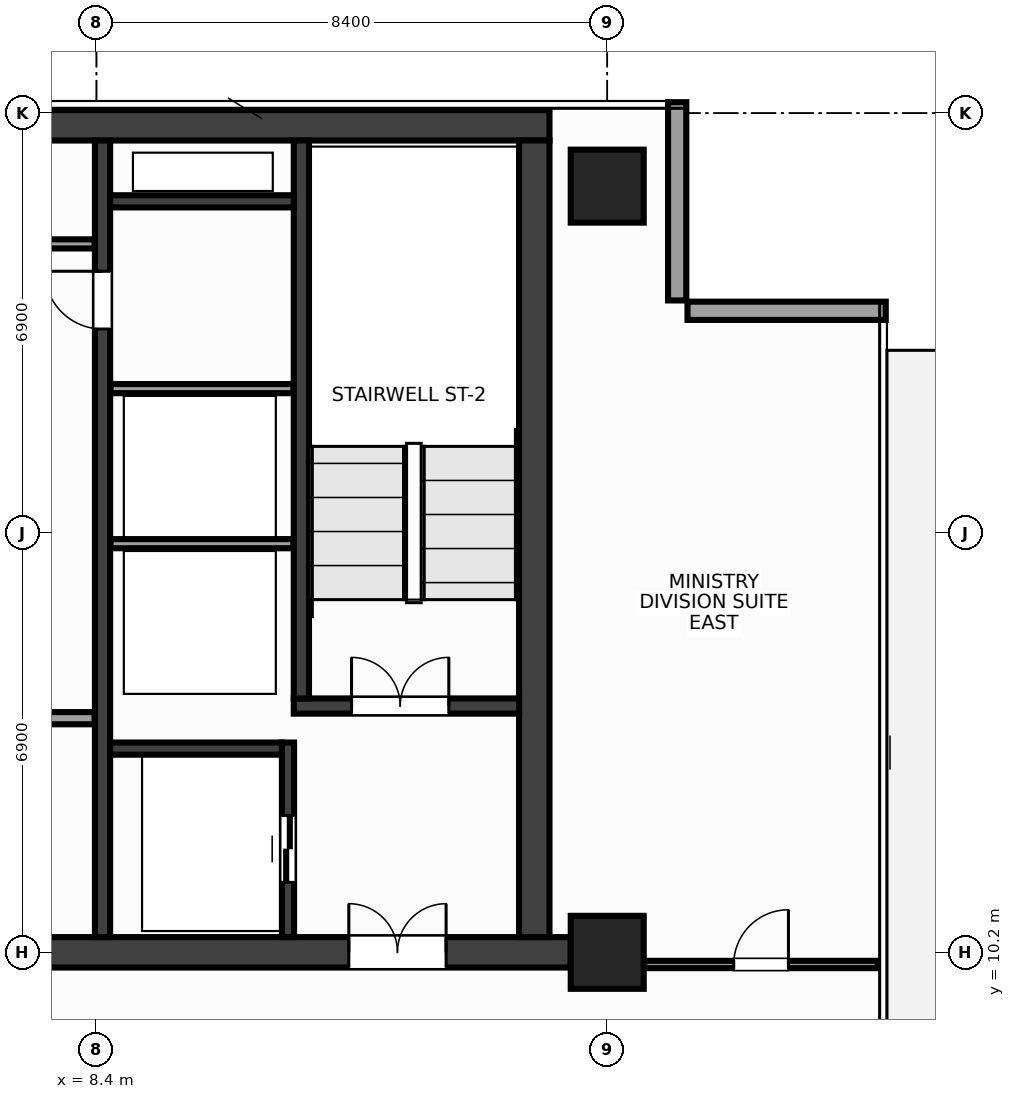
"""IFC4 building model, lengths in metres.
Left out: names, types, materials, properties, quantities, classifications, styles, units other than length and angle.
Written with IfcOpenShell. Run it as: python <this file> out.ifc"""

import sys

from ifc_helpers import new_model, si_unit, direction, frame, frame_2d, origin, origin_2d, place, context, subcontext, project, spatial, rectangle, extrude, source, transform, mapped, element, fill, save


model = new_model("IFC4")
c1 = context("Model", 3, precision=1e-05, world=origin(), true_north=direction((0.0, 1.0)))
c2 = subcontext(c1, "Body", "Model", "MODEL_VIEW")
j1 = project(units=[si_unit("LENGTHUNIT", "METRE"), si_unit("PLANEANGLEUNIT", "RADIAN")], contexts=[c1])
p1 = place(None, origin())
s1 = spatial("IfcSite", under=j1, at=p1, CompositionType="ELEMENT")
p2 = place(p1, origin())
s2 = spatial("IfcBuilding", under=s1, at=p2, CompositionType="ELEMENT")
p3 = place(p2, frame((0.0, 0.0, 272.0)))
s3 = spatial("IfcBuildingStorey", under=s2, at=p3, CompositionType="ELEMENT", Elevation=272.0)
m1 = source(origin(), c2, "Body", "SweptSolid", [
    extrude(rectangle(XDim=31.7, YDim=0.5, at=frame_2d((15.85, 0.0))), origin(), (0.0, 0.0, 1.0), 3.6),
])
p4 = place(p3, frame((-15.85, 23.8, 0.0), z_axis=(0.0, 0.0, 1.0), x_axis=(1.0, 0.0, 0.0)))
e1 = element("IfcWall", 1, at=p4, inside=s3, PredefinedType="SHEAR", context=c2, shape_type="MappedRepresentation", body=[
    mapped(m1, transform((0.0, 0.0, 0.0), x_axis=(1.0, 0.0, 0.0), y_axis=(0.0, 1.0, 0.0), z_axis=(0.0, 0.0, 1.0), scale=1.0)),
])
m2 = source(origin(), c2, "Body", "SweptSolid", [
    extrude(rectangle(XDim=32.4, YDim=0.5, at=frame_2d((16.2, 0.0))), origin(), (0.0, 0.0, 1.0), 3.6),
])
p5 = place(p3, frame((-16.2, 10.2, 0.0), z_axis=(0.0, 0.0, 1.0), x_axis=(1.0, 0.0, 0.0)))
e2 = element("IfcWall", 2, at=p5, inside=s3, PredefinedType="SHEAR", context=c2, shape_type="MappedRepresentation", body=[
    mapped(m2, transform((0.0, 0.0, 0.0), x_axis=(1.0, 0.0, 0.0), y_axis=(0.0, 1.0, 0.0), z_axis=(0.0, 0.0, 1.0), scale=1.0)),
])
p6 = place(p5, frame((2.05, 0.0, 0.0)))
e3 = element("IfcOpeningElement", 3, at=p6, cuts=e2, PredefinedType="OPENING", context=c2, shape_type="SweptSolid", body=[
    extrude(rectangle(XDim=1.6, YDim=2.15, at=frame_2d((0.8, 1.075))), frame((0.0, 0.262, 0.0), z_axis=(0.0, -1.0, 0.0), x_axis=(1.0, 0.0, 0.0)), (0.0, 0.0, 1.0), 0.524),
])
p7 = place(p5, frame((28.75, 0.0, 0.0)))
e4 = element("IfcOpeningElement", 4, at=p7, cuts=e2, PredefinedType="OPENING", context=c2, shape_type="SweptSolid", body=[
    extrude(rectangle(XDim=1.6, YDim=2.15, at=frame_2d((0.8, 1.075))), frame((0.0, 0.262, 0.0), z_axis=(0.0, -1.0, 0.0), x_axis=(1.0, 0.0, 0.0)), (0.0, 0.0, 1.0), 0.524),
])
p8 = place(p5, frame((15.45, 0.0, 0.0)))
e5 = element("IfcOpeningElement", 5, at=p8, cuts=e2, PredefinedType="OPENING", context=c2, shape_type="SweptSolid", body=[
    extrude(rectangle(XDim=1.5, YDim=2.2, at=frame_2d((0.75, 1.1))), frame((0.0, 0.262, 0.0), z_axis=(0.0, -1.0, 0.0), x_axis=(1.0, 0.0, 0.0)), (0.0, 0.0, 1.0), 0.524),
])
m3 = source(origin(), c2, "Body", "SweptSolid", [
    extrude(rectangle(XDim=13.1, YDim=0.5, at=frame_2d((6.55, 0.0))), origin(), (0.0, 0.0, 1.0), 3.6),
])
p9 = place(p3, frame((15.6, 10.45, 0.0), z_axis=(0.0, 0.0, 1.0), x_axis=(0.0, 1.0, 0.0)))
e6 = element("IfcWall", 6, at=p9, inside=s3, PredefinedType="SHEAR", context=c2, shape_type="MappedRepresentation", body=[
    mapped(m3, transform((0.0, 0.0, 0.0), x_axis=(1.0, 0.0, 0.0), y_axis=(0.0, 1.0, 0.0), z_axis=(0.0, 0.0, 1.0), scale=1.0)),
])
m4 = source(origin(), c2, "Body", "SweptSolid", [
    extrude(rectangle(XDim=13.1, YDim=0.25, at=frame_2d((6.55, 0.0))), origin(), (0.0, 0.0, 1.0), 3.6),
])
p10 = place(p3, frame((8.5, 10.45, 0.0), z_axis=(0.0, 0.0, 1.0), x_axis=(0.0, 1.0, 0.0)))
e7 = element("IfcWall", 7, at=p10, inside=s3, PredefinedType="SHEAR", context=c2, shape_type="MappedRepresentation", body=[
    mapped(m4, transform((0.0, 0.0, 0.0), x_axis=(1.0, 0.0, 0.0), y_axis=(0.0, 1.0, 0.0), z_axis=(0.0, 0.0, 1.0), scale=1.0)),
])
p11 = place(p10, frame((10.0, 0.0, 0.0)))
e8 = element("IfcOpeningElement", 8, at=p11, cuts=e7, PredefinedType="OPENING", context=c2, shape_type="SweptSolid", body=[
    extrude(rectangle(XDim=0.95, YDim=2.15, at=frame_2d((0.475, 1.075))), frame((0.0, 0.137, 0.0), z_axis=(0.0, -1.0, 0.0), x_axis=(1.0, 0.0, 0.0)), (0.0, 0.0, 1.0), 0.274),
])
m5 = source(origin(), c2, "Body", "SweptSolid", [
    extrude(rectangle(XDim=3.705, YDim=0.25, at=frame_2d((1.853, 0.0))), origin(), (0.0, 0.0, 1.0), 3.6),
])
p12 = place(p3, frame((11.645, 14.25, 0.0), z_axis=(0.0, 0.0, 1.0), x_axis=(1.0, 0.0, 0.0)))
e9 = element("IfcWall", 9, at=p12, inside=s3, PredefinedType="SHEAR", context=c2, shape_type="MappedRepresentation", body=[
    mapped(m5, transform((0.0, 0.0, 0.0), x_axis=(1.0, 0.0, 0.0), y_axis=(0.0, 1.0, 0.0), z_axis=(0.0, 0.0, 1.0), scale=1.0)),
])
p13 = place(p12, frame((0.95, 0.0, 0.0)))
e10 = element("IfcOpeningElement", 10, at=p13, cuts=e9, PredefinedType="OPENING", context=c2, shape_type="SweptSolid", body=[
    extrude(rectangle(XDim=1.6, YDim=2.15, at=frame_2d((0.8, 1.075))), frame((0.0, 0.137, 0.0), z_axis=(0.0, -1.0, 0.0), x_axis=(1.0, 0.0, 0.0)), (0.0, 0.0, 1.0), 0.274),
])
m6 = source(origin(), c2, "Body", "SweptSolid", [
    extrude(rectangle(XDim=9.175, YDim=0.25, at=frame_2d((4.587, 0.0))), origin(), (0.0, 0.0, 1.0), 3.6),
])
p14 = place(p3, frame((11.77, 14.375, 0.0), z_axis=(0.0, 0.0, 1.0), x_axis=(0.0, 1.0, 0.0)))
e11 = element("IfcWall", 11, at=p14, inside=s3, PredefinedType="SHEAR", context=c2, shape_type="MappedRepresentation", body=[
    mapped(m6, transform((0.0, 0.0, 0.0), x_axis=(1.0, 0.0, 0.0), y_axis=(0.0, 1.0, 0.0), z_axis=(0.0, 0.0, 1.0), scale=1.0)),
])
m7 = source(origin(), c2, "Body", "SweptSolid", [
    extrude(rectangle(XDim=3.2, YDim=0.2, at=frame_2d((1.6, 0.0))), origin(), (0.0, 0.0, 1.0), 3.6),
])
p15 = place(p3, frame((11.55, 10.45, 0.0), z_axis=(0.0, 0.0, 1.0), x_axis=(0.0, 1.0, 0.0)))
e12 = element("IfcWall", 12, at=p15, inside=s3, PredefinedType="SHEAR", context=c2, shape_type="MappedRepresentation", body=[
    mapped(m7, transform((0.0, 0.0, 0.0), x_axis=(1.0, 0.0, 0.0), y_axis=(0.0, 1.0, 0.0), z_axis=(0.0, 0.0, 1.0), scale=1.0)),
])
p16 = place(p15, frame((0.9, 0.0, 0.0)))
e13 = element("IfcOpeningElement", 13, at=p16, cuts=e12, PredefinedType="OPENING", context=c2, shape_type="SweptSolid", body=[
    extrude(rectangle(XDim=1.1, YDim=2.15, at=frame_2d((0.55, 1.075))), frame((0.0, 0.112, 0.0), z_axis=(0.0, -1.0, 0.0), x_axis=(1.0, 0.0, 0.0)), (0.0, 0.0, 1.0), 0.224),
])
m8 = source(origin(), c2, "Body", "SweptSolid", [
    extrude(rectangle(XDim=2.825, YDim=0.2, at=frame_2d((1.413, 0.0))), origin(), (0.0, 0.0, 1.0), 3.6),
])
p17 = place(p3, frame((8.625, 13.55, 0.0), z_axis=(0.0, 0.0, 1.0), x_axis=(1.0, 0.0, 0.0)))
e14 = element("IfcWall", 14, at=p17, inside=s3, PredefinedType="SHEAR", context=c2, shape_type="MappedRepresentation", body=[
    mapped(m8, transform((0.0, 0.0, 0.0), x_axis=(1.0, 0.0, 0.0), y_axis=(0.0, 1.0, 0.0), z_axis=(0.0, 0.0, 1.0), scale=1.0)),
])
m9 = source(origin(), c2, "Body", "SweptSolid", [
    extrude(rectangle(XDim=3.02, YDim=0.2, at=frame_2d((1.51, 0.0))), origin(), (0.0, 0.0, 1.0), 3.6),
])
p18 = place(p3, frame((8.625, 22.55, 0.0), z_axis=(0.0, 0.0, 1.0), x_axis=(1.0, 0.0, 0.0)))
e15 = element("IfcWall", 15, at=p18, inside=s3, PredefinedType="SHEAR", context=c2, shape_type="MappedRepresentation", body=[
    mapped(m9, transform((0.0, 0.0, 0.0), x_axis=(1.0, 0.0, 0.0), y_axis=(0.0, 1.0, 0.0), z_axis=(0.0, 0.0, 1.0), scale=1.0)),
])
m10 = source(origin(), c2, "Body", "SweptSolid", [
    extrude(rectangle(XDim=1.2, YDim=1.2, at=origin_2d()), origin(), (0.0, 0.0, 1.0), 3.6),
])
for number, where, z_axis, x_axis in (
    (16, (16.8, 10.2, 0.0), (0.0, 0.0, 1.0), (1.0, 0.0, 0.0)),
    (17, (16.8, 22.8, 0.0), (0.0, 0.0, 1.0), (1.0, 0.0, 0.0)),
):
    element("IfcColumn", number, at=place(p3, frame(where, z_axis=z_axis, x_axis=x_axis)), inside=s3, PredefinedType="COLUMN", context=c2, shape_type="MappedRepresentation", body=[
        mapped(m10, transform((0.0, 0.0, 0.0), x_axis=(1.0, 0.0, 0.0), y_axis=(0.0, 1.0, 0.0), z_axis=(0.0, 0.0, 1.0), scale=1.0)),
    ])
m11 = source(origin(), c2, "Body", "SweptSolid", [
    extrude(rectangle(XDim=3.26, YDim=0.3, at=frame_2d((1.63, 0.0))), origin(), (0.0, 0.0, 1.0), 2.75),
])
p19 = place(p3, frame((21.38, 20.75, 0.0), z_axis=(0.0, 0.0, 1.0), x_axis=(-1.0, 0.0, 0.0)))
e18 = element("IfcWall", 18, at=p19, inside=s3, PredefinedType="STANDARD", context=c2, shape_type="MappedRepresentation", body=[
    mapped(m11, transform((0.0, 0.0, 0.0), x_axis=(1.0, 0.0, 0.0), y_axis=(0.0, 1.0, 0.0), z_axis=(0.0, 0.0, 1.0), scale=1.0)),
])
m12 = source(origin(), c2, "Body", "SweptSolid", [
    extrude(rectangle(XDim=3.26, YDim=0.3, at=frame_2d((1.63, 0.0))), origin(), (0.0, 0.0, 1.0), 2.75),
])
p20 = place(p3, frame((17.95, 20.92, 0.0), z_axis=(0.0, 0.0, 1.0), x_axis=(0.0, 1.0, 0.0)))
e19 = element("IfcWall", 19, at=p20, inside=s3, PredefinedType="STANDARD", context=c2, shape_type="MappedRepresentation", body=[
    mapped(m12, transform((0.0, 0.0, 0.0), x_axis=(1.0, 0.0, 0.0), y_axis=(0.0, 1.0, 0.0), z_axis=(0.0, 0.0, 1.0), scale=1.0)),
])
m13 = source(origin(), c2, "Body", "SweptSolid", [
    extrude(rectangle(XDim=3.01, YDim=0.15, at=frame_2d((1.505, 0.0))), origin(), (0.0, 0.0, 1.0), 3.37),
])
for number, where, z_axis, x_axis in (
    (20, (8.63, 16.92, 0.0), (0.0, 0.0, 1.0), (1.0, 0.0, 0.0)),
    (21, (8.63, 19.47, 0.0), (0.0, 0.0, 1.0), (1.0, 0.0, 0.0)),
):
    element("IfcWall", number, at=place(p3, frame(where, z_axis=z_axis, x_axis=x_axis)), inside=s3, PredefinedType="PARTITIONING", context=c2, shape_type="MappedRepresentation", body=[
        mapped(m13, transform((0.0, 0.0, 0.0), x_axis=(1.0, 0.0, 0.0), y_axis=(0.0, 1.0, 0.0), z_axis=(0.0, 0.0, 1.0), scale=1.0)),
    ])
m14 = source(origin(), c2, "Body", "SweptSolid", [
    extrude(rectangle(XDim=7.07, YDim=0.2, at=frame_2d((3.535, 0.0))), origin(), (0.0, 0.0, 1.0), 3.37),
])
p21 = place(p3, frame((1.3, 14.05, 0.0), z_axis=(0.0, 0.0, 1.0), x_axis=(1.0, 0.0, 0.0)))
e22 = element("IfcWall", 22, at=p21, inside=s3, PredefinedType="PARTITIONING", context=c2, shape_type="MappedRepresentation", body=[
    mapped(m14, transform((0.0, 0.0, 0.0), x_axis=(1.0, 0.0, 0.0), y_axis=(0.0, 1.0, 0.0), z_axis=(0.0, 0.0, 1.0), scale=1.0)),
])
p22 = place(p21, frame((2.8, 0.0, 0.0)))
e23 = element("IfcOpeningElement", 23, at=p22, cuts=e22, PredefinedType="OPENING", context=c2, shape_type="SweptSolid", body=[
    extrude(rectangle(XDim=0.98, YDim=2.15, at=frame_2d((0.49, 1.075))), frame((0.0, 0.112, 0.0), z_axis=(0.0, -1.0, 0.0), x_axis=(1.0, 0.0, 0.0)), (0.0, 0.0, 1.0), 0.224),
])
m15 = source(origin(), c2, "Body", "SweptSolid", [
    extrude(rectangle(XDim=2.07, YDim=0.15, at=frame_2d((1.035, 0.0))), origin(), (0.0, 0.0, 1.0), 3.37),
])
p23 = place(p3, frame((6.3, 21.85, 0.0), z_axis=(0.0, 0.0, 1.0), x_axis=(1.0, 0.0, 0.0)))
e24 = element("IfcWall", 24, at=p23, inside=s3, PredefinedType="PARTITIONING", context=c2, shape_type="MappedRepresentation", body=[
    mapped(m15, transform((0.0, 0.0, 0.0), x_axis=(1.0, 0.0, 0.0), y_axis=(0.0, 1.0, 0.0), z_axis=(0.0, 0.0, 1.0), scale=1.0)),
])
m16 = source(origin(), c2, "Body", "SweptSolid", [
    extrude(rectangle(XDim=3.84, YDim=0.12, at=frame_2d((1.92, 0.0))), origin(), (0.0, 0.0, 1.0), 2.805),
])
p24 = place(p3, frame((17.41, 10.0, 0.0), z_axis=(0.0, 0.0, 1.0), x_axis=(1.0, 0.0, 0.0)))
e25 = element("IfcWall", 25, at=p24, inside=s3, PredefinedType="PARTITIONING", context=c2, shape_type="MappedRepresentation", body=[
    mapped(m16, transform((0.0, 0.0, 0.0), x_axis=(1.0, 0.0, 0.0), y_axis=(0.0, 1.0, 0.0), z_axis=(0.0, 0.0, 1.0), scale=1.0)),
])
p25 = place(p24, frame((1.47, 0.0, 0.0)))
e26 = element("IfcOpeningElement", 26, at=p25, cuts=e25, PredefinedType="OPENING", context=c2, shape_type="SweptSolid", body=[
    extrude(rectangle(XDim=0.9, YDim=2.15, at=frame_2d((0.45, 1.075))), frame((0.0, 0.072, 0.0), z_axis=(0.0, -1.0, 0.0), x_axis=(1.0, 0.0, 0.0)), (0.0, 0.0, 1.0), 0.144),
])
m17 = source(origin(), c2, "Body", "SweptSolid", [
    extrude(rectangle(XDim=1.6, YDim=2.15, at=frame_2d((0.8, 1.075))), frame((0.0, 0.025, 0.0), z_axis=(0.0, -1.0, 0.0), x_axis=(1.0, 0.0, 0.0)), (0.0, 0.0, 1.0), 0.05),
])
p26 = place(p13, origin())
e27 = element("IfcDoor", 27, at=p26, inside=s3, OperationType="DOUBLE_DOOR_SINGLE_SWING", PredefinedType="DOOR", context=c2, shape_type="MappedRepresentation", body=[
    mapped(m17, transform((0.0, 0.0, 0.0), x_axis=(1.0, 0.0, 0.0), y_axis=(0.0, 1.0, 0.0), z_axis=(0.0, 0.0, 1.0), scale=1.0)),
])
fill(e10, e27)
p27 = place(p7, origin())
e28 = element("IfcDoor", 28, at=p27, inside=s3, OperationType="DOUBLE_DOOR_SINGLE_SWING", PredefinedType="DOOR", context=c2, shape_type="MappedRepresentation", body=[
    mapped(m17, transform((0.0, 0.0, 0.0), x_axis=(1.0, 0.0, 0.0), y_axis=(0.0, 1.0, 0.0), z_axis=(0.0, 0.0, 1.0), scale=1.0)),
])
fill(e4, e28)
m18 = source(origin(), c2, "Body", "SweptSolid", [
    extrude(rectangle(XDim=1.1, YDim=2.15, at=frame_2d((0.55, 1.075))), frame((0.0, 0.025, 0.0), z_axis=(0.0, -1.0, 0.0), x_axis=(1.0, 0.0, 0.0)), (0.0, 0.0, 1.0), 0.05),
])
p28 = place(p16, origin())
e29 = element("IfcDoor", 29, at=p28, inside=s3, OperationType="DOUBLE_DOOR_SLIDING", PredefinedType="DOOR", context=c2, shape_type="MappedRepresentation", body=[
    mapped(m18, transform((0.0, 0.0, 0.0), x_axis=(1.0, 0.0, 0.0), y_axis=(0.0, 1.0, 0.0), z_axis=(0.0, 0.0, 1.0), scale=1.0)),
])
fill(e13, e29)
m19 = source(origin(), c2, "Body", "SweptSolid", [
    extrude(rectangle(XDim=0.95, YDim=2.15, at=frame_2d((0.475, 1.075))), frame((0.0, 0.025, 0.0), z_axis=(0.0, -1.0, 0.0), x_axis=(1.0, 0.0, 0.0)), (0.0, 0.0, 1.0), 0.05),
])
p29 = place(p11, origin())
e30 = element("IfcDoor", 30, at=p29, inside=s3, OperationType="SINGLE_SWING_RIGHT", PredefinedType="DOOR", context=c2, shape_type="MappedRepresentation", body=[
    mapped(m19, transform((0.0, 0.0, 0.0), x_axis=(1.0, 0.0, 0.0), y_axis=(0.0, 1.0, 0.0), z_axis=(0.0, 0.0, 1.0), scale=1.0)),
])
fill(e8, e30)
m20 = source(origin(), c2, "Body", "SweptSolid", [
    extrude(rectangle(XDim=0.9, YDim=2.15, at=frame_2d((0.45, 1.075))), frame((0.0, 0.025, 0.0), z_axis=(0.0, -1.0, 0.0), x_axis=(1.0, 0.0, 0.0)), (0.0, 0.0, 1.0), 0.05),
])
p30 = place(p25, origin())
e31 = element("IfcDoor", 31, at=p30, inside=s3, OperationType="SINGLE_SWING_RIGHT", PredefinedType="DOOR", context=c2, shape_type="MappedRepresentation", body=[
    mapped(m20, transform((0.0, 0.0, 0.0), x_axis=(1.0, 0.0, 0.0), y_axis=(0.0, 1.0, 0.0), z_axis=(0.0, 0.0, 1.0), scale=1.0)),
])
fill(e26, e31)
save(model, sys.argv[1])
